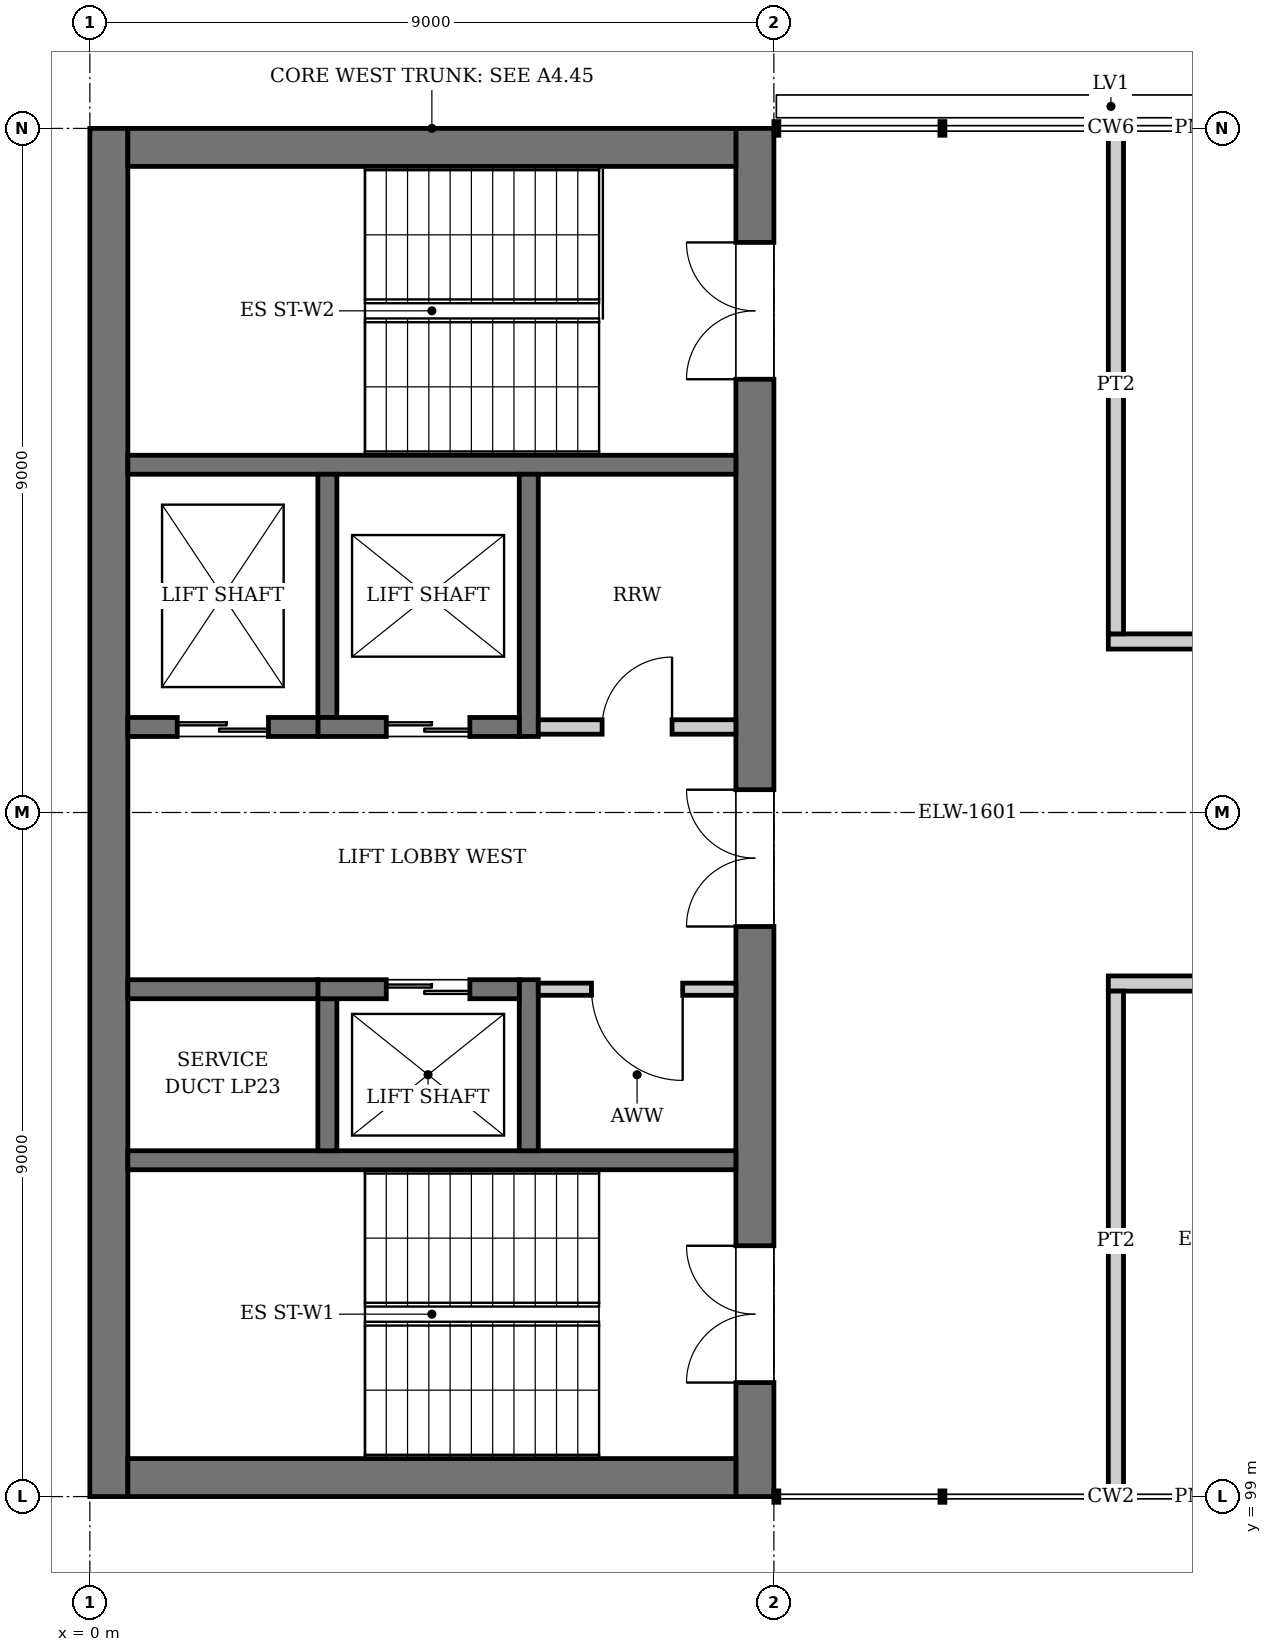
"""IFC4 building model, lengths in metres.
Left out: names, types, materials, properties, quantities, classifications, styles, units other than length and angle.
Written with IfcOpenShell. Run it as: python <this file> out.ifc"""

import sys

from ifc_helpers import new_model, si_unit, direction, frame, frame_2d, origin, place, context, subcontext, project, spatial, rectangle, extrude, element, fill, save


model = new_model("IFC4")
c1 = context("Model", 3, precision=1e-05, world=origin(), true_north=direction((0.0, 1.0)))
c2 = subcontext(c1, "Body", "Model", "MODEL_VIEW")
j1 = project(units=[si_unit("LENGTHUNIT", "METRE"), si_unit("PLANEANGLEUNIT", "RADIAN")], contexts=[c1])
p1 = place(None, origin())
s1 = spatial("IfcSite", under=j1, at=p1, CompositionType="ELEMENT")
p2 = place(p1, origin())
s2 = spatial("IfcBuilding", under=s1, at=p2, CompositionType="ELEMENT")
p3 = place(p2, frame((0.0, 0.0, 67.2)))
s3 = spatial("IfcBuildingStorey", under=s2, at=p3, CompositionType="ELEMENT", Elevation=67.2)
p4 = place(p3, frame((0.25, 99.0, 0.0), z_axis=(0.0, 0.0, 1.0), x_axis=(0.0, 1.0, 0.0)))
e1 = element("IfcWall", 1, at=p4, inside=s3, PredefinedType="SHEAR", context=c2, shape_type="SweptSolid", body=[
    extrude(rectangle(XDim=18.0, YDim=0.5, at=frame_2d((9.0, 0.0))), origin(), (0.0, 0.0, 1.0), 4.0),
])
p5 = place(p3, frame((8.75, 99.0, 0.0), z_axis=(0.0, 0.0, 1.0), x_axis=(0.0, 1.0, 0.0)))
e2 = element("IfcWall", 2, at=p5, inside=s3, PredefinedType="SHEAR", context=c2, shape_type="SweptSolid", body=[
    extrude(rectangle(XDim=18.0, YDim=0.5, at=frame_2d((9.0, 0.0))), origin(), (0.0, 0.0, 1.0), 4.0),
])
p6 = place(p5, frame((1.5, 0.0, 0.0)))
e3 = element("IfcOpeningElement", 3, at=p6, cuts=e2, PredefinedType="OPENING", context=c2, shape_type="SweptSolid", body=[
    extrude(rectangle(XDim=1.8, YDim=2.1, at=frame_2d((0.9, 1.05))), frame((0.0, 0.26, 0.0), z_axis=(0.0, -1.0, 0.0), x_axis=(1.0, 0.0, 0.0)), (0.0, 0.0, 1.0), 0.52),
])
p7 = place(p5, frame((14.7, 0.0, 0.0)))
e4 = element("IfcOpeningElement", 4, at=p7, cuts=e2, PredefinedType="OPENING", context=c2, shape_type="SweptSolid", body=[
    extrude(rectangle(XDim=1.8, YDim=2.1, at=frame_2d((0.9, 1.05))), frame((0.0, 0.26, 0.0), z_axis=(0.0, -1.0, 0.0), x_axis=(1.0, 0.0, 0.0)), (0.0, 0.0, 1.0), 0.52),
])
p8 = place(p5, frame((7.5, 0.0, 0.0)))
e5 = element("IfcOpeningElement", 5, at=p8, cuts=e2, PredefinedType="OPENING", context=c2, shape_type="SweptSolid", body=[
    extrude(rectangle(XDim=1.8, YDim=2.1, at=frame_2d((0.9, 1.05))), frame((0.0, 0.26, 0.0), z_axis=(0.0, -1.0, 0.0), x_axis=(1.0, 0.0, 0.0)), (0.0, 0.0, 1.0), 0.52),
])
for number, where, z_axis, x_axis in (
    (6, (0.5, 99.25, 0.0), (0.0, 0.0, 1.0), (1.0, 0.0, 0.0)),
    (7, (0.5, 116.75, 0.0), (0.0, 0.0, 1.0), (1.0, 0.0, 0.0)),
):
    element("IfcWall", number, at=place(p3, frame(where, z_axis=z_axis, x_axis=x_axis)), inside=s3, PredefinedType="SHEAR", context=c2, shape_type="SweptSolid", body=[
        extrude(rectangle(XDim=8.0, YDim=0.5, at=frame_2d((4.0, 0.0))), origin(), (0.0, 0.0, 1.0), 4.0),
    ])
for number, where, z_axis, x_axis in (
    (8, (8.5, 103.425, 0.0), (0.0, 0.0, 1.0), (-1.0, 0.0, 0.0)),
    (9, (8.5, 112.575, 0.0), (0.0, 0.0, 1.0), (-1.0, 0.0, 0.0)),
):
    element("IfcWall", number, at=place(p3, frame(where, z_axis=z_axis, x_axis=x_axis)), inside=s3, PredefinedType="SOLIDWALL", context=c2, shape_type="SweptSolid", body=[
        extrude(rectangle(XDim=8.0, YDim=0.25, at=frame_2d((4.0, 0.0))), origin(), (0.0, 0.0, 1.0), 3.75),
    ])
p9 = place(p3, frame((5.775, 103.55, 0.0), z_axis=(0.0, 0.0, 1.0), x_axis=(0.0, 1.0, 0.0)))
e10 = element("IfcWall", 10, at=p9, inside=s3, PredefinedType="SOLIDWALL", context=c2, shape_type="SweptSolid", body=[
    extrude(rectangle(XDim=2.25, YDim=0.25, at=frame_2d((1.125, 0.0))), origin(), (0.0, 0.0, 1.0), 4.0),
])
p10 = place(p3, frame((3.125, 103.55, 0.0), z_axis=(0.0, 0.0, 1.0), x_axis=(0.0, 1.0, 0.0)))
e11 = element("IfcWall", 11, at=p10, inside=s3, PredefinedType="SOLIDWALL", context=c2, shape_type="SweptSolid", body=[
    extrude(rectangle(XDim=2.0, YDim=0.25, at=frame_2d((1.0, 0.0))), origin(), (0.0, 0.0, 1.0), 4.0),
])
p11 = place(p3, frame((5.65, 105.675, 0.0), z_axis=(0.0, 0.0, 1.0), x_axis=(-1.0, 0.0, 0.0)))
e12 = element("IfcWall", 12, at=p11, inside=s3, PredefinedType="SOLIDWALL", context=c2, shape_type="SweptSolid", body=[
    extrude(rectangle(XDim=2.65, YDim=0.25, at=frame_2d((1.325, 0.0))), origin(), (0.0, 0.0, 1.0), 4.0),
])
p12 = place(p11, frame((0.65, 0.0, 0.0)))
e13 = element("IfcOpeningElement", 13, at=p12, cuts=e12, PredefinedType="OPENING", context=c2, shape_type="SweptSolid", body=[
    extrude(rectangle(XDim=1.1, YDim=2.1, at=frame_2d((0.55, 1.05))), frame((0.0, 0.135, 0.0), z_axis=(0.0, -1.0, 0.0), x_axis=(1.0, 0.0, 0.0)), (0.0, 0.0, 1.0), 0.27),
])
p13 = place(p3, frame((3.0, 105.675, 0.0), z_axis=(0.0, 0.0, 1.0), x_axis=(-1.0, 0.0, 0.0)))
e14 = element("IfcWall", 14, at=p13, inside=s3, PredefinedType="SOLIDWALL", context=c2, shape_type="SweptSolid", body=[
    extrude(rectangle(XDim=2.5, YDim=0.25, at=frame_2d((1.25, 0.0))), origin(), (0.0, 0.0, 1.0), 4.0),
])
p14 = place(p3, frame((5.775, 109.0, 0.0), z_axis=(0.0, 0.0, 1.0), x_axis=(0.0, 1.0, 0.0)))
e15 = element("IfcWall", 15, at=p14, inside=s3, PredefinedType="SOLIDWALL", context=c2, shape_type="SweptSolid", body=[
    extrude(rectangle(XDim=3.45, YDim=0.25, at=frame_2d((1.725, 0.0))), origin(), (0.0, 0.0, 1.0), 4.0),
])
p15 = place(p3, frame((3.125, 109.25, 0.0), z_axis=(0.0, 0.0, 1.0), x_axis=(0.0, 1.0, 0.0)))
e16 = element("IfcWall", 16, at=p15, inside=s3, PredefinedType="SOLIDWALL", context=c2, shape_type="SweptSolid", body=[
    extrude(rectangle(XDim=3.2, YDim=0.25, at=frame_2d((1.6, 0.0))), origin(), (0.0, 0.0, 1.0), 4.0),
])
p16 = place(p3, frame((5.65, 109.125, 0.0), z_axis=(0.0, 0.0, 1.0), x_axis=(-1.0, 0.0, 0.0)))
e17 = element("IfcWall", 17, at=p16, inside=s3, PredefinedType="SOLIDWALL", context=c2, shape_type="SweptSolid", body=[
    extrude(rectangle(XDim=2.65, YDim=0.25, at=frame_2d((1.325, 0.0))), origin(), (0.0, 0.0, 1.0), 4.0),
])
p17 = place(p16, frame((0.65, 0.0, 0.0)))
e18 = element("IfcOpeningElement", 18, at=p17, cuts=e17, PredefinedType="OPENING", context=c2, shape_type="SweptSolid", body=[
    extrude(rectangle(XDim=1.1, YDim=2.1, at=frame_2d((0.55, 1.05))), frame((0.0, 0.135, 0.0), z_axis=(0.0, -1.0, 0.0), x_axis=(1.0, 0.0, 0.0)), (0.0, 0.0, 1.0), 0.27),
])
p18 = place(p3, frame((3.0, 109.125, 0.0), z_axis=(0.0, 0.0, 1.0), x_axis=(-1.0, 0.0, 0.0)))
e19 = element("IfcWall", 19, at=p18, inside=s3, PredefinedType="SOLIDWALL", context=c2, shape_type="SweptSolid", body=[
    extrude(rectangle(XDim=2.5, YDim=0.25, at=frame_2d((1.25, 0.0))), origin(), (0.0, 0.0, 1.0), 4.0),
])
p19 = place(p18, frame((0.65, 0.0, 0.0)))
e20 = element("IfcOpeningElement", 20, at=p19, cuts=e19, PredefinedType="OPENING", context=c2, shape_type="SweptSolid", body=[
    extrude(rectangle(XDim=1.2, YDim=2.1, at=frame_2d((0.6, 1.05))), frame((0.0, 0.135, 0.0), z_axis=(0.0, -1.0, 0.0), x_axis=(1.0, 0.0, 0.0)), (0.0, 0.0, 1.0), 0.27),
])
p20 = place(p3, frame((8.5, 105.675, 0.0), z_axis=(0.0, 0.0, 1.0), x_axis=(-1.0, 0.0, 0.0)))
e21 = element("IfcWall", 21, at=p20, inside=s3, PredefinedType="PARTITIONING", context=c2, shape_type="SweptSolid", body=[
    extrude(rectangle(XDim=2.6, YDim=0.16, at=frame_2d((1.3, 0.0))), origin(), (0.0, 0.0, 1.0), 3.75),
])
p21 = place(p20, frame((0.7, 0.0, 0.0)))
e22 = element("IfcOpeningElement", 22, at=p21, cuts=e21, PredefinedType="OPENING", context=c2, shape_type="SweptSolid", body=[
    extrude(rectangle(XDim=1.2, YDim=2.1, at=frame_2d((0.6, 1.05))), frame((0.0, 0.09, 0.0), z_axis=(0.0, -1.0, 0.0), x_axis=(1.0, 0.0, 0.0)), (0.0, 0.0, 1.0), 0.18),
])
p22 = place(p3, frame((8.5, 109.125, 0.0), z_axis=(0.0, 0.0, 1.0), x_axis=(-1.0, 0.0, 0.0)))
e23 = element("IfcWall", 23, at=p22, inside=s3, PredefinedType="PARTITIONING", context=c2, shape_type="SweptSolid", body=[
    extrude(rectangle(XDim=2.6, YDim=0.19, at=frame_2d((1.3, 0.0))), origin(), (0.0, 0.0, 1.0), 3.75),
])
p23 = place(p22, frame((0.84, 0.0, 0.0)))
e24 = element("IfcOpeningElement", 24, at=p23, cuts=e23, PredefinedType="OPENING", context=c2, shape_type="SweptSolid", body=[
    extrude(rectangle(XDim=0.92, YDim=2.1, at=frame_2d((0.46, 1.05))), frame((0.0, 0.105, 0.0), z_axis=(0.0, -1.0, 0.0), x_axis=(1.0, 0.0, 0.0)), (0.0, 0.0, 1.0), 0.21),
])
p24 = place(p3, frame((13.4, 105.75, 0.0), z_axis=(0.0, 0.0, 1.0), x_axis=(1.0, 0.0, 0.0)))
e25 = element("IfcWall", 25, at=p24, inside=s3, PredefinedType="PARTITIONING", context=c2, shape_type="SweptSolid", body=[
    extrude(rectangle(XDim=8.95, YDim=0.2, at=frame_2d((4.475, 0.0))), origin(), (0.0, 0.0, 1.0), 2.9),
])
p25 = place(p24, frame((1.95, 0.0, 0.0)))
e26 = element("IfcOpeningElement", 26, at=p25, cuts=e25, PredefinedType="OPENING", context=c2, shape_type="SweptSolid", body=[
    extrude(rectangle(XDim=0.8, YDim=2.1, at=frame_2d((0.4, 1.05))), frame((0.0, 0.11, 0.0), z_axis=(0.0, -1.0, 0.0), x_axis=(1.0, 0.0, 0.0)), (0.0, 0.0, 1.0), 0.22),
])
p26 = place(p24, frame((6.39, 0.0, 0.0)))
e27 = element("IfcOpeningElement", 27, at=p26, cuts=e25, PredefinedType="OPENING", context=c2, shape_type="SweptSolid", body=[
    extrude(rectangle(XDim=0.92, YDim=2.1, at=frame_2d((0.46, 1.05))), frame((0.0, 0.11, 0.0), z_axis=(0.0, -1.0, 0.0), x_axis=(1.0, 0.0, 0.0)), (0.0, 0.0, 1.0), 0.22),
])
p27 = place(p3, frame((13.4, 110.25, 0.0), z_axis=(0.0, 0.0, 1.0), x_axis=(1.0, 0.0, 0.0)))
e28 = element("IfcWall", 28, at=p27, inside=s3, PredefinedType="PARTITIONING", context=c2, shape_type="SweptSolid", body=[
    extrude(rectangle(XDim=27.2, YDim=0.2, at=frame_2d((13.6, 0.0))), origin(), (0.0, 0.0, 1.0), 2.9),
])
p28 = place(p27, frame((4.05, 0.0, 0.0)))
e29 = element("IfcOpeningElement", 29, at=p28, cuts=e28, PredefinedType="OPENING", context=c2, shape_type="SweptSolid", body=[
    extrude(rectangle(XDim=1.1, YDim=2.4, at=frame_2d((0.55, 1.2))), frame((0.0, 0.11, 0.0), z_axis=(0.0, -1.0, 0.0), x_axis=(1.0, 0.0, 0.0)), (0.0, 0.0, 1.0), 0.22),
])
p29 = place(p27, frame((12.7, 0.0, 0.0)))
e30 = element("IfcOpeningElement", 30, at=p29, cuts=e28, PredefinedType="OPENING", context=c2, shape_type="SweptSolid", body=[
    extrude(rectangle(XDim=1.8, YDim=2.1, at=frame_2d((0.9, 1.05))), frame((0.0, 0.11, 0.0), z_axis=(0.0, -1.0, 0.0), x_axis=(1.0, 0.0, 0.0)), (0.0, 0.0, 1.0), 0.22),
])
p30 = place(p27, frame((21.7, 0.0, 0.0)))
e31 = element("IfcOpeningElement", 31, at=p30, cuts=e28, PredefinedType="OPENING", context=c2, shape_type="SweptSolid", body=[
    extrude(rectangle(XDim=1.8, YDim=2.1, at=frame_2d((0.9, 1.05))), frame((0.0, 0.11, 0.0), z_axis=(0.0, -1.0, 0.0), x_axis=(1.0, 0.0, 0.0)), (0.0, 0.0, 1.0), 0.22),
])
p31 = place(p3, frame((13.5, 99.075, 0.0), z_axis=(0.0, 0.0, 1.0), x_axis=(0.0, 1.0, 0.0)))
e32 = element("IfcWall", 32, at=p31, inside=s3, PredefinedType="PARTITIONING", context=c2, shape_type="SweptSolid", body=[
    extrude(rectangle(XDim=6.575, YDim=0.2, at=frame_2d((3.288, 0.0))), origin(), (0.0, 0.0, 1.0), 2.9),
])
p32 = place(p3, frame((13.5, 110.35, 0.0), z_axis=(0.0, 0.0, 1.0), x_axis=(0.0, 1.0, 0.0)))
e33 = element("IfcWall", 33, at=p32, inside=s3, PredefinedType="PARTITIONING", context=c2, shape_type="SweptSolid", body=[
    extrude(rectangle(XDim=6.56, YDim=0.2, at=frame_2d((3.28, 0.0))), origin(), (0.0, 0.0, 1.0), 2.9),
])
p33 = place(p12, origin())
e34 = element("IfcDoor", 34, at=p33, inside=s3, OperationType="DOUBLE_DOOR_SLIDING", PredefinedType="DOOR", context=c2, shape_type="SweptSolid", body=[
    extrude(rectangle(XDim=1.1, YDim=2.1, at=frame_2d((0.55, 1.05))), frame((0.0, 0.025, 0.0), z_axis=(0.0, -1.0, 0.0), x_axis=(1.0, 0.0, 0.0)), (0.0, 0.0, 1.0), 0.05),
])
fill(e13, e34)
p34 = place(p17, origin())
e35 = element("IfcDoor", 35, at=p34, inside=s3, OperationType="DOUBLE_DOOR_SLIDING", PredefinedType="DOOR", context=c2, shape_type="SweptSolid", body=[
    extrude(rectangle(XDim=1.1, YDim=2.1, at=frame_2d((0.55, 1.05))), frame((0.0, 0.025, 0.0), z_axis=(0.0, -1.0, 0.0), x_axis=(1.0, 0.0, 0.0)), (0.0, 0.0, 1.0), 0.05),
])
fill(e18, e35)
p35 = place(p19, origin())
e36 = element("IfcDoor", 36, at=p35, inside=s3, OperationType="DOUBLE_DOOR_SLIDING", PredefinedType="DOOR", context=c2, shape_type="SweptSolid", body=[
    extrude(rectangle(XDim=1.2, YDim=2.1, at=frame_2d((0.6, 1.05))), frame((0.0, 0.025, 0.0), z_axis=(0.0, -1.0, 0.0), x_axis=(1.0, 0.0, 0.0)), (0.0, 0.0, 1.0), 0.05),
])
fill(e20, e36)
p36 = place(p6, origin())
e37 = element("IfcDoor", 37, at=p36, inside=s3, OperationType="DOUBLE_DOOR_SINGLE_SWING", PredefinedType="DOOR", context=c2, shape_type="SweptSolid", body=[
    extrude(rectangle(XDim=1.8, YDim=2.1, at=frame_2d((0.9, 1.05))), frame((0.0, 0.025, 0.0), z_axis=(0.0, -1.0, 0.0), x_axis=(1.0, 0.0, 0.0)), (0.0, 0.0, 1.0), 0.05),
])
fill(e3, e37)
p37 = place(p7, origin())
e38 = element("IfcDoor", 38, at=p37, inside=s3, OperationType="DOUBLE_DOOR_SINGLE_SWING", PredefinedType="DOOR", context=c2, shape_type="SweptSolid", body=[
    extrude(rectangle(XDim=1.8, YDim=2.1, at=frame_2d((0.9, 1.05))), frame((0.0, 0.025, 0.0), z_axis=(0.0, -1.0, 0.0), x_axis=(1.0, 0.0, 0.0)), (0.0, 0.0, 1.0), 0.05),
])
fill(e4, e38)
p38 = place(p8, origin())
e39 = element("IfcDoor", 39, at=p38, inside=s3, OperationType="DOUBLE_DOOR_SINGLE_SWING", PredefinedType="DOOR", context=c2, shape_type="SweptSolid", body=[
    extrude(rectangle(XDim=1.8, YDim=2.1, at=frame_2d((0.9, 1.05))), frame((0.0, 0.025, 0.0), z_axis=(0.0, -1.0, 0.0), x_axis=(1.0, 0.0, 0.0)), (0.0, 0.0, 1.0), 0.05),
])
fill(e5, e39)
p39 = place(p21, origin())
e40 = element("IfcDoor", 40, at=p39, inside=s3, OperationType="SINGLE_SWING_LEFT", PredefinedType="DOOR", context=c2, shape_type="SweptSolid", body=[
    extrude(rectangle(XDim=1.2, YDim=2.1, at=frame_2d((0.6, 1.05))), frame((0.0, 0.025, 0.0), z_axis=(0.0, -1.0, 0.0), x_axis=(1.0, 0.0, 0.0)), (0.0, 0.0, 1.0), 0.05),
])
fill(e22, e40)
p40 = place(p23, frame((0.92, 0.0, 0.0), z_axis=(0.0, 0.0, 1.0), x_axis=(-1.0, 0.0, 0.0)))
e41 = element("IfcDoor", 41, at=p40, inside=s3, OperationType="SINGLE_SWING_RIGHT", PredefinedType="DOOR", context=c2, shape_type="SweptSolid", body=[
    extrude(rectangle(XDim=0.92, YDim=2.1, at=frame_2d((0.46, 1.05))), frame((0.0, 0.025, 0.0), z_axis=(0.0, -1.0, 0.0), x_axis=(1.0, 0.0, 0.0)), (0.0, 0.0, 1.0), 0.05),
])
fill(e24, e41)
save(model, sys.argv[1])
